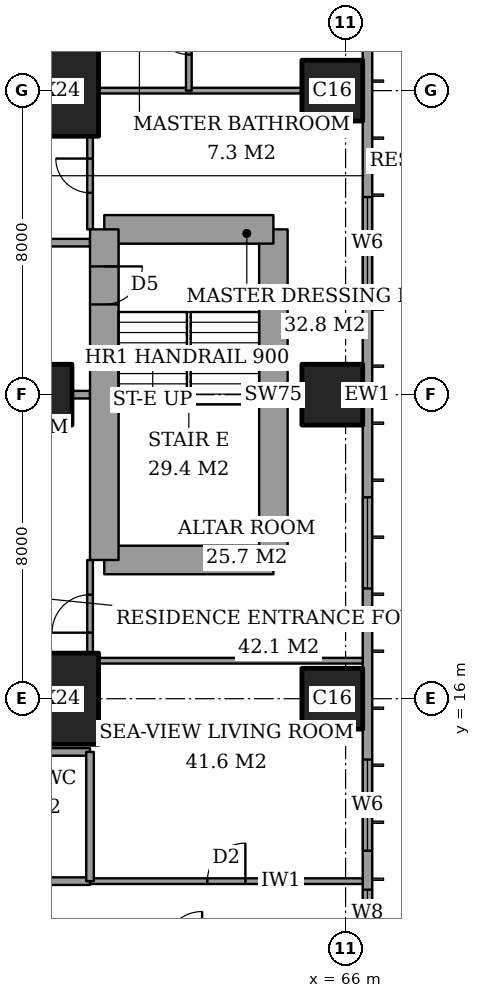
"""IFC4 building model, lengths in metres.
Left out: names, types, materials, properties, quantities, classifications, styles, units other than length and angle.
Written with IfcOpenShell. Run it as: python <this file> out.ifc"""

import sys

from ifc_helpers import new_model, si_unit, direction, frame, frame_2d, origin, origin_2d, place, context, subcontext, project, spatial, rectangle, extrude, element, fill, save


model = new_model("IFC4")
c1 = context("Model", 3, precision=1e-05, world=origin(), true_north=direction((0.0, 1.0)))
c2 = subcontext(c1, "Body", "Model", "MODEL_VIEW")
j1 = project(units=[si_unit("LENGTHUNIT", "METRE"), si_unit("PLANEANGLEUNIT", "RADIAN")], contexts=[c1])
p1 = place(None, origin())
s1 = spatial("IfcSite", under=j1, at=p1, CompositionType="ELEMENT")
p2 = place(p1, origin())
s2 = spatial("IfcBuilding", under=s1, at=p2, CompositionType="ELEMENT")
p3 = place(p2, frame((0.0, 0.0, 252.0)))
s3 = spatial("IfcBuildingStorey", under=s2, at=p3, CompositionType="ELEMENT", Elevation=252.0)
p4 = place(p3, frame((58.0, 16.0, 0.0), z_axis=(0.0, 0.0, 1.0), x_axis=(1.0, 0.0, 0.0)))
e1 = element("IfcColumn", 1, at=p4, inside=s3, PredefinedType="COLUMN", context=c2, shape_type="SweptSolid", body=[
    extrude(rectangle(XDim=3.0, YDim=2.4, at=origin_2d()), origin(), (0.0, 0.0, 1.0), 3.6),
])
p5 = place(p3, frame((58.0, 24.0, 0.0), z_axis=(0.0, 0.0, 1.0), x_axis=(1.0, 0.0, 0.0)))
e2 = element("IfcColumn", 2, at=p5, inside=s3, PredefinedType="COLUMN", context=c2, shape_type="SweptSolid", body=[
    extrude(rectangle(XDim=1.6, YDim=1.6, at=origin_2d()), origin(), (0.0, 0.0, 1.0), 3.6),
])
p6 = place(p3, frame((58.0, 32.0, 0.0), z_axis=(0.0, 0.0, 1.0), x_axis=(1.0, 0.0, 0.0)))
e3 = element("IfcColumn", 3, at=p6, inside=s3, PredefinedType="COLUMN", context=c2, shape_type="SweptSolid", body=[
    extrude(rectangle(XDim=3.0, YDim=2.4, at=origin_2d()), origin(), (0.0, 0.0, 1.0), 3.6),
])
for number, where, z_axis, x_axis in (
    (4, (65.65, 16.0, 0.0), (0.0, 0.0, 1.0), (1.0, 0.0, 0.0)),
    (5, (65.65, 24.0, 0.0), (0.0, 0.0, 1.0), (1.0, 0.0, 0.0)),
    (6, (65.65, 32.0, 0.0), (0.0, 0.0, 1.0), (1.0, 0.0, 0.0)),
):
    element("IfcColumn", number, at=place(p3, frame(where, z_axis=z_axis, x_axis=x_axis)), inside=s3, PredefinedType="COLUMN", context=c2, shape_type="SweptSolid", body=[
        extrude(rectangle(XDim=1.6, YDim=1.6, at=origin_2d()), origin(), (0.0, 0.0, 1.0), 3.6),
    ])
p7 = place(p3, frame((59.65, 19.65, 0.0), z_axis=(0.0, 0.0, 1.0), x_axis=(1.0, 0.0, 0.0)))
e7 = element("IfcWall", 7, at=p7, inside=s3, PredefinedType="SHEAR", context=c2, shape_type="SweptSolid", body=[
    extrude(rectangle(XDim=4.45, YDim=0.75, at=frame_2d((2.225, 0.0))), origin(), (0.0, 0.0, 1.0), 3.6),
])
p8 = place(p3, frame((64.1, 19.65, 0.0), z_axis=(0.0, 0.0, 1.0), x_axis=(0.0, 1.0, 0.0)))
e8 = element("IfcWall", 8, at=p8, inside=s3, PredefinedType="SHEAR", context=c2, shape_type="SweptSolid", body=[
    extrude(rectangle(XDim=8.7, YDim=0.75, at=frame_2d((4.35, 0.0))), origin(), (0.0, 0.0, 1.0), 3.6),
])
p9 = place(p3, frame((64.1, 28.35, 0.0), z_axis=(0.0, 0.0, 1.0), x_axis=(-1.0, 0.0, 0.0)))
e9 = element("IfcWall", 9, at=p9, inside=s3, PredefinedType="SHEAR", context=c2, shape_type="SweptSolid", body=[
    extrude(rectangle(XDim=4.45, YDim=0.75, at=frame_2d((2.225, 0.0))), origin(), (0.0, 0.0, 1.0), 3.6),
])
p10 = place(p3, frame((59.65, 28.35, 0.0), z_axis=(0.0, 0.0, 1.0), x_axis=(0.0, -1.0, 0.0)))
e10 = element("IfcWall", 10, at=p10, inside=s3, PredefinedType="SHEAR", context=c2, shape_type="SweptSolid", body=[
    extrude(rectangle(XDim=8.7, YDim=0.75, at=frame_2d((4.35, 0.0))), origin(), (0.0, 0.0, 1.0), 3.6),
])
p11 = place(p10, frame((0.975, 0.0, 0.0)))
e11 = element("IfcOpeningElement", 11, at=p11, cuts=e10, PredefinedType="OPENING", context=c2, shape_type="SweptSolid", body=[
    extrude(rectangle(XDim=1.0, YDim=2.1, at=frame_2d((0.5, 1.05))), frame((0.0, 0.385, 0.0), z_axis=(0.0, -1.0, 0.0), x_axis=(1.0, 0.0, 0.0)), (0.0, 0.0, 1.0), 0.77),
])
p12 = place(p3, frame((66.575, 3.175, 0.0), z_axis=(0.0, 0.0, 1.0), x_axis=(0.0, 1.0, 0.0)))
e12 = element("IfcWall", 12, at=p12, inside=s3, PredefinedType="SOLIDWALL", context=c2, shape_type="SweptSolid", body=[
    extrude(rectangle(XDim=41.65, YDim=0.25, at=frame_2d((20.825, 0.0))), origin(), (0.0, 0.0, 1.0), 3.6),
])
p13 = place(p12, frame((0.875, 0.0, 0.6)))
e13 = element("IfcOpeningElement", 13, at=p13, cuts=e12, PredefinedType="OPENING", context=c2, shape_type="SweptSolid", body=[
    extrude(rectangle(XDim=2.4, YDim=2.0, at=frame_2d((1.2, 1.0))), frame((0.0, 0.135, 0.0), z_axis=(0.0, -1.0, 0.0), x_axis=(1.0, 0.0, 0.0)), (0.0, 0.0, 1.0), 0.27),
])
p14 = place(p12, frame((6.6, 0.0, 0.6)))
e14 = element("IfcOpeningElement", 14, at=p14, cuts=e12, PredefinedType="OPENING", context=c2, shape_type="SweptSolid", body=[
    extrude(rectangle(XDim=1.2, YDim=2.0, at=frame_2d((0.6, 1.0))), frame((0.0, 0.135, 0.0), z_axis=(0.0, -1.0, 0.0), x_axis=(1.0, 0.0, 0.0)), (0.0, 0.0, 1.0), 0.27),
])
p15 = place(p12, frame((8.825, 0.0, 0.6)))
e15 = element("IfcOpeningElement", 15, at=p15, cuts=e12, PredefinedType="OPENING", context=c2, shape_type="SweptSolid", body=[
    extrude(rectangle(XDim=2.4, YDim=2.0, at=frame_2d((1.2, 1.0))), frame((0.0, 0.135, 0.0), z_axis=(0.0, -1.0, 0.0), x_axis=(1.0, 0.0, 0.0)), (0.0, 0.0, 1.0), 0.27),
])
p16 = place(p12, frame((15.725, 0.0, 0.6)))
e16 = element("IfcOpeningElement", 16, at=p16, cuts=e12, PredefinedType="OPENING", context=c2, shape_type="SweptSolid", body=[
    extrude(rectangle(XDim=2.4, YDim=2.0, at=frame_2d((1.2, 1.0))), frame((0.0, 0.135, 0.0), z_axis=(0.0, -1.0, 0.0), x_axis=(1.0, 0.0, 0.0)), (0.0, 0.0, 1.0), 0.27),
])
p17 = place(p12, frame((23.625, 0.0, 0.6)))
e17 = element("IfcOpeningElement", 17, at=p17, cuts=e12, PredefinedType="OPENING", context=c2, shape_type="SweptSolid", body=[
    extrude(rectangle(XDim=2.4, YDim=2.0, at=frame_2d((1.2, 1.0))), frame((0.0, 0.135, 0.0), z_axis=(0.0, -1.0, 0.0), x_axis=(1.0, 0.0, 0.0)), (0.0, 0.0, 1.0), 0.27),
])
p18 = place(p12, frame((30.725, 0.0, 0.6)))
e18 = element("IfcOpeningElement", 18, at=p18, cuts=e12, PredefinedType="OPENING", context=c2, shape_type="SweptSolid", body=[
    extrude(rectangle(XDim=2.4, YDim=2.0, at=frame_2d((1.2, 1.0))), frame((0.0, 0.135, 0.0), z_axis=(0.0, -1.0, 0.0), x_axis=(1.0, 0.0, 0.0)), (0.0, 0.0, 1.0), 0.27),
])
p19 = place(p12, frame((34.525, 0.0, 0.6)))
e19 = element("IfcOpeningElement", 19, at=p19, cuts=e12, PredefinedType="OPENING", context=c2, shape_type="SweptSolid", body=[
    extrude(rectangle(XDim=1.2, YDim=2.0, at=frame_2d((0.6, 1.0))), frame((0.0, 0.135, 0.0), z_axis=(0.0, -1.0, 0.0), x_axis=(1.0, 0.0, 0.0)), (0.0, 0.0, 1.0), 0.27),
])
p20 = place(p12, frame((38.375, 0.0, 0.6)))
e20 = element("IfcOpeningElement", 20, at=p20, cuts=e12, PredefinedType="OPENING", context=c2, shape_type="SweptSolid", body=[
    extrude(rectangle(XDim=2.4, YDim=2.0, at=frame_2d((1.2, 1.0))), frame((0.0, 0.135, 0.0), z_axis=(0.0, -1.0, 0.0), x_axis=(1.0, 0.0, 0.0)), (0.0, 0.0, 1.0), 0.27),
])
p21 = place(p3, frame((55.6, 11.2, 0.0), z_axis=(0.0, 0.0, 1.0), x_axis=(1.0, 0.0, 0.0)))
e21 = element("IfcWall", 21, at=p21, inside=s3, PredefinedType="PARTITIONING", context=c2, shape_type="SweptSolid", body=[
    extrude(rectangle(XDim=3.675, YDim=0.2, at=frame_2d((1.837, 0.0))), origin(), (0.0, 0.0, 1.0), 3.35),
])
p22 = place(p21, frame((1.387, 0.0, 0.0)))
e22 = element("IfcOpeningElement", 22, at=p22, cuts=e21, PredefinedType="OPENING", context=c2, shape_type="SweptSolid", body=[
    extrude(rectangle(XDim=0.9, YDim=2.1, at=frame_2d((0.45, 1.05))), frame((0.0, 0.11, 0.0), z_axis=(0.0, -1.0, 0.0), x_axis=(1.0, 0.0, 0.0)), (0.0, 0.0, 1.0), 0.22),
])
p23 = place(p3, frame((59.275, 11.2, 0.0), z_axis=(0.0, 0.0, 1.0), x_axis=(1.0, 0.0, 0.0)))
e23 = element("IfcWall", 23, at=p23, inside=s3, PredefinedType="PARTITIONING", context=c2, shape_type="SweptSolid", body=[
    extrude(rectangle(XDim=7.175, YDim=0.15, at=frame_2d((3.587, 0.0))), origin(), (0.0, 0.0, 1.0), 3.35),
])
p24 = place(p23, frame((3.087, 0.0, 0.0)))
e24 = element("IfcOpeningElement", 24, at=p24, cuts=e23, PredefinedType="OPENING", context=c2, shape_type="SweptSolid", body=[
    extrude(rectangle(XDim=1.0, YDim=2.1, at=frame_2d((0.5, 1.05))), frame((0.0, 0.085, 0.0), z_axis=(0.0, -1.0, 0.0), x_axis=(1.0, 0.0, 0.0)), (0.0, 0.0, 1.0), 0.17),
])
p25 = place(p3, frame((55.6, 14.6, 0.0), z_axis=(0.0, 0.0, 1.0), x_axis=(1.0, 0.0, 0.0)))
e25 = element("IfcWall", 25, at=p25, inside=s3, PredefinedType="PARTITIONING", context=c2, shape_type="SweptSolid", body=[
    extrude(rectangle(XDim=3.675, YDim=0.2, at=frame_2d((1.837, 0.0))), origin(), (0.0, 0.0, 1.0), 3.35),
])
p26 = place(p3, frame((59.5, 17.0, 0.0), z_axis=(0.0, 0.0, 1.0), x_axis=(1.0, 0.0, 0.0)))
e26 = element("IfcWall", 26, at=p26, inside=s3, PredefinedType="PARTITIONING", context=c2, shape_type="SweptSolid", body=[
    extrude(rectangle(XDim=6.95, YDim=0.15, at=frame_2d((3.475, 0.0))), origin(), (0.0, 0.0, 1.0), 3.35),
])
p27 = place(p3, frame((58.8, 24.0, 0.0), z_axis=(0.0, 0.0, 1.0), x_axis=(1.0, 0.0, 0.0)))
e27 = element("IfcWall", 27, at=p27, inside=s3, PredefinedType="PARTITIONING", context=c2, shape_type="SweptSolid", body=[
    extrude(rectangle(XDim=0.475, YDim=0.2, at=frame_2d((0.237, 0.0))), origin(), (0.0, 0.0, 1.0), 3.35),
])
p28 = place(p3, frame((64.475, 24.0, 0.0), z_axis=(0.0, 0.0, 1.0), x_axis=(1.0, 0.0, 0.0)))
e28 = element("IfcWall", 28, at=p28, inside=s3, PredefinedType="PARTITIONING", context=c2, shape_type="SweptSolid", body=[
    extrude(rectangle(XDim=0.375, YDim=0.15, at=frame_2d((0.188, 0.0))), origin(), (0.0, 0.0, 1.0), 3.35),
])
p29 = place(p3, frame((42.0, 28.0, 0.0), z_axis=(0.0, 0.0, 1.0), x_axis=(1.0, 0.0, 0.0)))
e29 = element("IfcWall", 29, at=p29, inside=s3, PredefinedType="PARTITIONING", context=c2, shape_type="SweptSolid", body=[
    extrude(rectangle(XDim=17.275, YDim=0.2, at=frame_2d((8.637, 0.0))), origin(), (0.0, 0.0, 1.0), 3.35),
])
p30 = place(p29, frame((9.4, 0.0, 0.0)))
e30 = element("IfcOpeningElement", 30, at=p30, cuts=e29, PredefinedType="OPENING", context=c2, shape_type="SweptSolid", body=[
    extrude(rectangle(XDim=1.2, YDim=2.4, at=frame_2d((0.6, 1.2))), frame((0.0, 0.11, 0.0), z_axis=(0.0, -1.0, 0.0), x_axis=(1.0, 0.0, 0.0)), (0.0, 0.0, 1.0), 0.22),
])
p31 = place(p3, frame((59.5, 32.0, 0.0), z_axis=(0.0, 0.0, 1.0), x_axis=(1.0, 0.0, 0.0)))
e31 = element("IfcWall", 31, at=p31, inside=s3, PredefinedType="PARTITIONING", context=c2, shape_type="SweptSolid", body=[
    extrude(rectangle(XDim=5.35, YDim=0.15, at=frame_2d((2.675, 0.0))), origin(), (0.0, 0.0, 1.0), 2.634),
])
p32 = place(p3, frame((59.275, 11.2, 0.0), z_axis=(0.0, 0.0, 1.0), x_axis=(0.0, 1.0, 0.0)))
e32 = element("IfcWall", 32, at=p32, inside=s3, PredefinedType="PARTITIONING", context=c2, shape_type="SweptSolid", body=[
    extrude(rectangle(XDim=3.4, YDim=0.2, at=frame_2d((1.7, 0.0))), origin(), (0.0, 0.0, 1.0), 3.35),
])
p33 = place(p3, frame((59.275, 17.2, 0.0), z_axis=(0.0, 0.0, 1.0), x_axis=(0.0, 1.0, 0.0)))
e33 = element("IfcWall", 33, at=p33, inside=s3, PredefinedType="PARTITIONING", context=c2, shape_type="SweptSolid", body=[
    extrude(rectangle(XDim=2.45, YDim=0.15, at=frame_2d((1.225, 0.0))), origin(), (0.0, 0.0, 1.0), 3.35),
])
p34 = place(p33, frame((0.538, 0.0, 0.0)))
e34 = element("IfcOpeningElement", 34, at=p34, cuts=e33, PredefinedType="OPENING", context=c2, shape_type="SweptSolid", body=[
    extrude(rectangle(XDim=1.0, YDim=2.1, at=frame_2d((0.5, 1.05))), frame((0.0, 0.085, 0.0), z_axis=(0.0, -1.0, 0.0), x_axis=(1.0, 0.0, 0.0)), (0.0, 0.0, 1.0), 0.17),
])
p35 = place(p3, frame((59.275, 28.35, 0.0), z_axis=(0.0, 0.0, 1.0), x_axis=(0.0, 1.0, 0.0)))
e35 = element("IfcWall", 35, at=p35, inside=s3, PredefinedType="PARTITIONING", context=c2, shape_type="SweptSolid", body=[
    extrude(rectangle(XDim=2.45, YDim=0.15, at=frame_2d((1.225, 0.0))), origin(), (0.0, 0.0, 1.0), 3.35),
])
p36 = place(p35, frame((0.962, 0.0, 0.0)))
e36 = element("IfcOpeningElement", 36, at=p36, cuts=e35, PredefinedType="OPENING", context=c2, shape_type="SweptSolid", body=[
    extrude(rectangle(XDim=0.9, YDim=2.1, at=frame_2d((0.45, 1.05))), frame((0.0, 0.085, 0.0), z_axis=(0.0, -1.0, 0.0), x_axis=(1.0, 0.0, 0.0)), (0.0, 0.0, 1.0), 0.17),
])
p37 = place(p3, frame((61.875, 32.0, 0.0), z_axis=(0.0, 0.0, 1.0), x_axis=(0.0, 1.0, 0.0)))
e37 = element("IfcWall", 37, at=p37, inside=s3, PredefinedType="PARTITIONING", context=c2, shape_type="SweptSolid", body=[
    extrude(rectangle(XDim=2.8, YDim=0.15, at=frame_2d((1.4, 0.0))), origin(), (0.0, 0.0, 1.0), 3.35),
])
p38 = place(p37, frame((0.95, 0.0, 0.0)))
e38 = element("IfcOpeningElement", 38, at=p38, cuts=e37, PredefinedType="OPENING", context=c2, shape_type="SweptSolid", body=[
    extrude(rectangle(XDim=0.9, YDim=2.1, at=frame_2d((0.45, 1.05))), frame((0.0, 0.085, 0.0), z_axis=(0.0, -1.0, 0.0), x_axis=(1.0, 0.0, 0.0)), (0.0, 0.0, 1.0), 0.17),
])
p39 = place(p14, origin())
e39 = element("IfcWindow", 39, at=p39, inside=s3, PartitioningType="SINGLE_PANEL", PredefinedType="WINDOW", context=c2, shape_type="SweptSolid", body=[
    extrude(rectangle(XDim=1.2, YDim=2.0, at=frame_2d((0.6, 1.0))), frame((0.0, 0.03, 0.0), z_axis=(0.0, -1.0, 0.0), x_axis=(1.0, 0.0, 0.0)), (0.0, 0.0, 1.0), 0.06),
])
fill(e14, e39)
p40 = place(p15, origin())
e40 = element("IfcWindow", 40, at=p40, inside=s3, PartitioningType="SINGLE_PANEL", PredefinedType="WINDOW", context=c2, shape_type="SweptSolid", body=[
    extrude(rectangle(XDim=2.4, YDim=2.0, at=frame_2d((1.2, 1.0))), frame((0.0, 0.03, 0.0), z_axis=(0.0, -1.0, 0.0), x_axis=(1.0, 0.0, 0.0)), (0.0, 0.0, 1.0), 0.06),
])
fill(e15, e40)
p41 = place(p16, origin())
e41 = element("IfcWindow", 41, at=p41, inside=s3, PartitioningType="SINGLE_PANEL", PredefinedType="WINDOW", context=c2, shape_type="SweptSolid", body=[
    extrude(rectangle(XDim=2.4, YDim=2.0, at=frame_2d((1.2, 1.0))), frame((0.0, 0.03, 0.0), z_axis=(0.0, -1.0, 0.0), x_axis=(1.0, 0.0, 0.0)), (0.0, 0.0, 1.0), 0.06),
])
fill(e16, e41)
p42 = place(p17, origin())
e42 = element("IfcWindow", 42, at=p42, inside=s3, PartitioningType="SINGLE_PANEL", PredefinedType="WINDOW", context=c2, shape_type="SweptSolid", body=[
    extrude(rectangle(XDim=2.4, YDim=2.0, at=frame_2d((1.2, 1.0))), frame((0.0, 0.03, 0.0), z_axis=(0.0, -1.0, 0.0), x_axis=(1.0, 0.0, 0.0)), (0.0, 0.0, 1.0), 0.06),
])
fill(e17, e42)
p43 = place(p24, origin())
e43 = element("IfcDoor", 43, at=p43, inside=s3, OperationType="SINGLE_SWING_LEFT", PredefinedType="DOOR", context=c2, shape_type="SweptSolid", body=[
    extrude(rectangle(XDim=1.0, YDim=2.1, at=frame_2d((0.5, 1.05))), frame((0.0, 0.025, 0.0), z_axis=(0.0, -1.0, 0.0), x_axis=(1.0, 0.0, 0.0)), (0.0, 0.0, 1.0), 0.05),
])
fill(e24, e43)
p44 = place(p34, origin())
e44 = element("IfcDoor", 44, at=p44, inside=s3, OperationType="SINGLE_SWING_RIGHT", PredefinedType="DOOR", context=c2, shape_type="SweptSolid", body=[
    extrude(rectangle(XDim=1.0, YDim=2.1, at=frame_2d((0.5, 1.05))), frame((0.0, 0.025, 0.0), z_axis=(0.0, -1.0, 0.0), x_axis=(1.0, 0.0, 0.0)), (0.0, 0.0, 1.0), 0.05),
])
fill(e34, e44)
p45 = place(p38, origin())
e45 = element("IfcDoor", 45, at=p45, inside=s3, OperationType="SINGLE_SWING_LEFT", PredefinedType="DOOR", context=c2, shape_type="SweptSolid", body=[
    extrude(rectangle(XDim=0.9, YDim=2.1, at=frame_2d((0.45, 1.05))), frame((0.0, 0.025, 0.0), z_axis=(0.0, -1.0, 0.0), x_axis=(1.0, 0.0, 0.0)), (0.0, 0.0, 1.0), 0.05),
])
fill(e38, e45)
p46 = place(p36, origin())
e46 = element("IfcDoor", 46, at=p46, inside=s3, OperationType="SINGLE_SWING_LEFT", PredefinedType="DOOR", context=c2, shape_type="SweptSolid", body=[
    extrude(rectangle(XDim=0.9, YDim=2.1, at=frame_2d((0.45, 1.05))), frame((0.0, 0.025, 0.0), z_axis=(0.0, -1.0, 0.0), x_axis=(1.0, 0.0, 0.0)), (0.0, 0.0, 1.0), 0.05),
])
fill(e36, e46)
p47 = place(p11, origin())
e47 = element("IfcDoor", 47, at=p47, inside=s3, OperationType="SINGLE_SWING_RIGHT", PredefinedType="DOOR", context=c2, shape_type="SweptSolid", body=[
    extrude(rectangle(XDim=1.0, YDim=2.1, at=frame_2d((0.5, 1.05))), frame((0.0, 0.025, 0.0), z_axis=(0.0, -1.0, 0.0), x_axis=(1.0, 0.0, 0.0)), (0.0, 0.0, 1.0), 0.05),
])
fill(e11, e47)
save(model, sys.argv[1])
